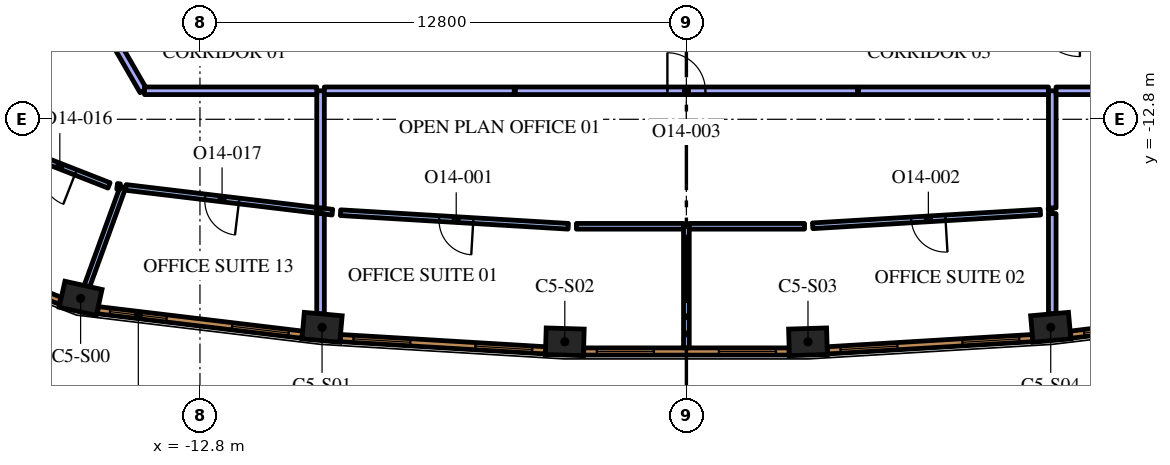
"""IFC4 building model, lengths in metres.
Left out: names, types, materials, properties, quantities, classifications, styles, units other than length and angle.
Written with IfcOpenShell. Run it as: python <this file> out.ifc"""

import sys

from ifc_helpers import new_model, si_unit, direction, frame, frame_2d, origin, origin_2d, place, context, subcontext, project, spatial, rectangle, extrude, element, fill, save


model = new_model("IFC4")
c1 = context("Model", 3, precision=1e-05, world=origin(), true_north=direction((0.0, 1.0)))
c2 = subcontext(c1, "Body", "Model", "MODEL_VIEW")
j1 = project(units=[si_unit("LENGTHUNIT", "METRE"), si_unit("PLANEANGLEUNIT", "RADIAN")], contexts=[c1])
p1 = place(None, origin())
s1 = spatial("IfcSite", under=j1, at=p1, CompositionType="ELEMENT")
p2 = place(p1, origin())
s2 = spatial("IfcBuilding", under=s1, at=p2, CompositionType="ELEMENT")
p3 = place(p2, frame((0.0, 0.0, 313.2)))
s3 = spatial("IfcBuildingStorey", under=s2, at=p3, CompositionType="ELEMENT", Elevation=313.2)
for number, where, z_axis, x_axis in (
    (1, (-15.941, -17.512, 0.0), (0.0, 0.0, 1.0), (0.976, -0.217, 0.0)),
    (2, (-9.587, -18.274, 0.0), (0.0, 0.0, 1.0), (0.996, -0.089, 0.0)),
    (3, (-3.199, -18.655, 0.0), (0.0, 0.0, 1.0), (1.0, -0.03, 0.0)),
    (4, (3.199, -18.655, 0.0), (0.0, 0.0, 1.0), (1.0, 0.03, 0.0)),
    (5, (9.587, -18.274, 0.0), (0.0, 0.0, 1.0), (0.996, 0.089, 0.0)),
):
    element("IfcColumn", number, at=place(p3, frame(where, z_axis=z_axis, x_axis=x_axis)), inside=s3, PredefinedType="COLUMN", context=c2, shape_type="SweptSolid", body=[
        extrude(rectangle(XDim=1.0, YDim=0.7, at=origin_2d()), origin(), (0.0, 0.0, 1.0), 4.2),
    ])
p4 = place(p3, frame((0.0, -15.615, 0.0), z_axis=(0.0, 0.0, 1.0), x_axis=(0.0, -1.0, 0.0)))
e6 = element("IfcWall", 6, at=p4, inside=s3, PredefinedType="PARTITIONING", context=c2, shape_type="SweptSolid", body=[
    extrude(rectangle(XDim=3.2, YDim=0.15, at=frame_2d((1.6, 0.0))), origin(), (0.0, 0.0, 1.0), 3.55),
])
p5 = place(p3, frame((-9.627, -15.207, 0.0), z_axis=(0.0, 0.0, 1.0), x_axis=(0.992909886905, -0.118869493503, 0.0)))
e7 = element("IfcWall", 7, at=p5, inside=s3, PredefinedType="PARTITIONING", context=c2, shape_type="SweptSolid", body=[
    extrude(rectangle(XDim=0.314, YDim=0.15, at=frame_2d((0.157, 0.0))), origin(), (0.0, 0.0, 1.0), 3.55),
])
p6 = place(p3, frame((-3.109, -15.615, 0.0), z_axis=(0.0, 0.0, 1.0), x_axis=(-0.998221243398, 0.059618363188, 0.0)))
e8 = element("IfcWall", 8, at=p6, inside=s3, PredefinedType="PARTITIONING", context=c2, shape_type="SweptSolid", body=[
    extrude(rectangle(XDim=6.003, YDim=0.15, at=frame_2d((3.002, 0.0))), origin(), (0.0, 0.0, 1.0), 3.55),
])
p7 = place(p6, frame((2.503, 0.0, 0.0)))
e9 = element("IfcOpeningElement", 9, at=p7, cuts=e8, PredefinedType="OPENING", context=c2, shape_type="SweptSolid", body=[
    extrude(rectangle(XDim=0.9, YDim=2.1, at=frame_2d((0.45, 1.05))), frame((0.0, 0.085, 0.0), z_axis=(0.0, -1.0, 0.0), x_axis=(1.0, 0.0, 0.0)), (0.0, 0.0, 1.0), 0.17),
])
p8 = place(p3, frame((-2.895, -15.615, 0.0), z_axis=(0.0, 0.0, 1.0), x_axis=(1.0, 0.0, 0.0)))
e10 = element("IfcWall", 10, at=p8, inside=s3, PredefinedType="PARTITIONING", context=c2, shape_type="SweptSolid", body=[
    extrude(rectangle(XDim=2.82, YDim=0.15, at=frame_2d((1.41, 0.0))), origin(), (0.0, 0.0, 1.0), 3.55),
])
p9 = place(p3, frame((-9.627, -17.919, 0.0), z_axis=(0.0, 0.0, 1.0), x_axis=(0.0, 1.0, 0.0)))
e11 = element("IfcWall", 11, at=p9, inside=s3, PredefinedType="PARTITIONING", context=c2, shape_type="SweptSolid", body=[
    extrude(rectangle(XDim=2.636, YDim=0.2, at=frame_2d((1.318, 0.0))), origin(), (0.0, 0.0, 1.0), 3.55),
])
p10 = place(p3, frame((0.075, -15.615, 0.0), z_axis=(0.0, 0.0, 1.0), x_axis=(1.0, 0.0, 0.0)))
e12 = element("IfcWall", 12, at=p10, inside=s3, PredefinedType="PARTITIONING", context=c2, shape_type="SweptSolid", body=[
    extrude(rectangle(XDim=3.034, YDim=0.15, at=frame_2d((1.517, 0.0))), origin(), (0.0, 0.0, 1.0), 3.55),
])
p11 = place(p3, frame((9.315, -15.244, 0.0), z_axis=(0.0, 0.0, 1.0), x_axis=(-0.998218822372, -0.059658885864, 0.0)))
e13 = element("IfcWall", 13, at=p11, inside=s3, PredefinedType="PARTITIONING", context=c2, shape_type="SweptSolid", body=[
    extrude(rectangle(XDim=6.003, YDim=0.15, at=frame_2d((3.002, 0.0))), origin(), (0.0, 0.0, 1.0), 3.55),
])
p12 = place(p11, frame((2.503, 0.0, 0.0)))
e14 = element("IfcOpeningElement", 14, at=p12, cuts=e13, PredefinedType="OPENING", context=c2, shape_type="SweptSolid", body=[
    extrude(rectangle(XDim=0.9, YDim=2.1, at=frame_2d((0.45, 1.05))), frame((0.0, 0.085, 0.0), z_axis=(0.0, -1.0, 0.0), x_axis=(1.0, 0.0, 0.0)), (0.0, 0.0, 1.0), 0.17),
])
p13 = place(p3, frame((9.528, -15.219, 0.0), z_axis=(0.0, 0.0, 1.0), x_axis=(0.992830592569, 0.119529973061, 0.0)))
e15 = element("IfcWall", 15, at=p13, inside=s3, PredefinedType="PARTITIONING", context=c2, shape_type="SweptSolid", body=[
    extrude(rectangle(XDim=0.1, YDim=0.15, at=frame_2d((0.05, 0.0))), origin(), (0.0, 0.0, 1.0), 3.55),
])
p14 = place(p3, frame((9.627, -15.283, 0.0), z_axis=(0.0, 0.0, 1.0), x_axis=(0.0, -1.0, 0.0)))
e16 = element("IfcWall", 16, at=p14, inside=s3, PredefinedType="PARTITIONING", context=c2, shape_type="SweptSolid", body=[
    extrude(rectangle(XDim=2.636, YDim=0.2, at=frame_2d((1.318, 0.0))), origin(), (0.0, 0.0, 1.0), 3.55),
])
for number, where, z_axis, x_axis in (
    (17, (9.627, -12.05, 0.0), (0.0, 0.0, 1.0), (0.0, -1.0, 0.0)),
    (18, (-9.627, -15.132, 0.0), (0.0, 0.0, 1.0), (0.0, 1.0, 0.0)),
):
    element("IfcWall", number, at=place(p3, frame(where, z_axis=z_axis, x_axis=x_axis)), inside=s3, PredefinedType="PARTITIONING", context=c2, shape_type="SweptSolid", body=[
        extrude(rectangle(XDim=3.082, YDim=0.2, at=frame_2d((1.541, 0.0))), origin(), (0.0, 0.0, 1.0), 3.55),
    ])
p15 = place(p3, frame((-4.5, -12.05, 0.0), z_axis=(0.0, 0.0, 1.0), x_axis=(1.0, 0.0, 0.0)))
e19 = element("IfcWall", 19, at=p15, inside=s3, PredefinedType="PARTITIONING", context=c2, shape_type="SweptSolid", body=[
    extrude(rectangle(XDim=9.0, YDim=0.2, at=frame_2d((4.5, 0.0))), origin(), (0.0, 0.0, 1.0), 3.55),
])
p16 = place(p15, frame((4.0, 0.0, 0.0)))
e20 = element("IfcOpeningElement", 20, at=p16, cuts=e19, PredefinedType="OPENING", context=c2, shape_type="SweptSolid", body=[
    extrude(rectangle(XDim=1.0, YDim=2.1, at=frame_2d((0.5, 1.05))), frame((0.0, 0.11, 0.0), z_axis=(0.0, -1.0, 0.0), x_axis=(1.0, 0.0, 0.0)), (0.0, 0.0, 1.0), 0.22),
])
for number, where, z_axis, x_axis in (
    (21, (-9.527, -12.05, 0.0), (0.0, 0.0, 1.0), (1.0, 0.0, 0.0)),
    (22, (4.53, -12.05, 0.0), (0.0, 0.0, 1.0), (1.0, 0.0, 0.0)),
):
    element("IfcWall", number, at=place(p3, frame(where, z_axis=z_axis, x_axis=x_axis)), inside=s3, PredefinedType="PARTITIONING", context=c2, shape_type="SweptSolid", body=[
        extrude(rectangle(XDim=4.997, YDim=0.2, at=frame_2d((2.499, 0.0))), origin(), (0.0, 0.0, 1.0), 3.55),
    ])
p17 = place(p3, frame((9.727, -12.05, 0.0), z_axis=(0.0, 0.0, 1.0), x_axis=(1.0, 0.0, 0.0)))
e23 = element("IfcWall", 23, at=p17, inside=s3, PredefinedType="PARTITIONING", context=c2, shape_type="SweptSolid", body=[
    extrude(rectangle(XDim=4.562, YDim=0.2, at=frame_2d((2.281, 0.0))), origin(), (0.0, 0.0, 1.0), 3.55),
])
p18 = place(p17, frame((1.8, 0.0, 0.0)))
e24 = element("IfcOpeningElement", 24, at=p18, cuts=e23, PredefinedType="OPENING", context=c2, shape_type="SweptSolid", body=[
    extrude(rectangle(XDim=1.0, YDim=2.1, at=frame_2d((0.5, 1.05))), frame((0.0, 0.11, 0.0), z_axis=(0.0, -1.0, 0.0), x_axis=(1.0, 0.0, 0.0)), (0.0, 0.0, 1.0), 0.22),
])
p19 = place(p3, frame((-14.826, -14.584, 0.0), z_axis=(0.0, 0.0, 1.0), x_axis=(-0.341806672652, -0.9397702903, 0.0)))
e25 = element("IfcWall", 25, at=p19, inside=s3, PredefinedType="PARTITIONING", context=c2, shape_type="SweptSolid", body=[
    extrude(rectangle(XDim=2.773, YDim=0.15, at=frame_2d((1.387, 0.0))), origin(), (0.0, 0.0, 1.0), 3.55),
])
p20 = place(p3, frame((-15.193, -14.54, 0.0), z_axis=(0.0, 0.0, 1.0), x_axis=(-0.930968616147, 0.36509921357, 0.0)))
e26 = element("IfcWall", 26, at=p20, inside=s3, PredefinedType="PARTITIONING", context=c2, shape_type="SweptSolid", body=[
    extrude(rectangle(XDim=2.841, YDim=0.15, at=frame_2d((1.42, 0.0))), origin(), (0.0, 0.0, 1.0), 3.55),
])
p21 = place(p20, frame((0.941, 0.0, 0.0)))
e27 = element("IfcOpeningElement", 27, at=p21, cuts=e26, PredefinedType="OPENING", context=c2, shape_type="SweptSolid", body=[
    extrude(rectangle(XDim=0.9, YDim=2.1, at=frame_2d((0.45, 1.05))), frame((0.0, 0.085, 0.0), z_axis=(0.0, -1.0, 0.0), x_axis=(1.0, 0.0, 0.0)), (0.0, 0.0, 1.0), 0.17),
])
p22 = place(p3, frame((-14.98, -14.565, 0.0), z_axis=(0.0, 0.0, 1.0), x_axis=(0.992847073299, -0.119393002485, 0.0)))
e28 = element("IfcWall", 28, at=p22, inside=s3, PredefinedType="PARTITIONING", context=c2, shape_type="SweptSolid", body=[
    extrude(rectangle(XDim=0.078, YDim=0.15, at=frame_2d((0.039, 0.0))), origin(), (0.0, 0.0, 1.0), 3.55),
])
p23 = place(p3, frame((-9.727, -15.195, 0.0), z_axis=(0.0, 0.0, 1.0), x_axis=(-0.992892587246, 0.119013907556, 0.0)))
e29 = element("IfcWall", 29, at=p23, inside=s3, PredefinedType="PARTITIONING", context=c2, shape_type="SweptSolid", body=[
    extrude(rectangle(XDim=5.059, YDim=0.15, at=frame_2d((2.529, 0.0))), origin(), (0.0, 0.0, 1.0), 3.55),
])
p24 = place(p23, frame((2.059, 0.0, 0.0)))
e30 = element("IfcOpeningElement", 30, at=p24, cuts=e29, PredefinedType="OPENING", context=c2, shape_type="SweptSolid", body=[
    extrude(rectangle(XDim=0.9, YDim=2.1, at=frame_2d((0.45, 1.05))), frame((0.0, 0.085, 0.0), z_axis=(0.0, -1.0, 0.0), x_axis=(1.0, 0.0, 0.0)), (0.0, 0.0, 1.0), 0.17),
])
p25 = place(p3, frame((-17.364, -11.064, 0.0), z_axis=(0.0, 0.0, 1.0), x_axis=(0.866018827591, 0.500011390128, 0.0)))
e31 = element("IfcWall", 31, at=p25, inside=s3, PredefinedType="PARTITIONING", context=c2, shape_type="SweptSolid", body=[
    extrude(rectangle(XDim=2.17, YDim=0.2, at=frame_2d((1.085, 0.0))), origin(), (0.0, 0.0, 1.0), 3.55),
])
p26 = place(p3, frame((-15.47, -10.005, 0.0), z_axis=(0.0, 0.0, 1.0), x_axis=(0.500053625724, -0.865994440744, 0.0)))
e32 = element("IfcWall", 32, at=p26, inside=s3, PredefinedType="PARTITIONING", context=c2, shape_type="SweptSolid", body=[
    extrude(rectangle(XDim=2.361, YDim=0.2, at=frame_2d((1.181, 0.0))), origin(), (0.0, 0.0, 1.0), 3.55),
])
p27 = place(p3, frame((-14.26, -12.05, 0.0), z_axis=(0.0, 0.0, 1.0), x_axis=(1.0, 0.0, 0.0)))
e33 = element("IfcWall", 33, at=p27, inside=s3, PredefinedType="PARTITIONING", context=c2, shape_type="SweptSolid", body=[
    extrude(rectangle(XDim=4.532, YDim=0.2, at=frame_2d((2.266, 0.0))), origin(), (0.0, 0.0, 1.0), 3.55),
])
p28 = place(p3, frame((-15.487, -17.823, 0.0), z_axis=(0.0, 0.0, 1.0), x_axis=(0.992885582795, -0.119072328769, 0.0)))
e34 = element("IfcWall", 34, at=p28, inside=s3, PredefinedType="SOLIDWALL", context=c2, shape_type="SweptSolid", body=[
    extrude(rectangle(XDim=5.415, YDim=0.19, at=frame_2d((2.708, 0.0))), origin(), (0.0, 0.0, 1.0), 3.95),
])
p29 = place(p28, frame((0.323, 0.0, 0.6)))
e35 = element("IfcOpeningElement", 35, at=p29, cuts=e34, PredefinedType="OPENING", context=c2, shape_type="SweptSolid", body=[
    extrude(rectangle(XDim=1.5, YDim=2.85, at=frame_2d((0.75, 1.425))), frame((0.0, 0.105, 0.0), z_axis=(0.0, -1.0, 0.0), x_axis=(1.0, 0.0, 0.0)), (0.0, 0.0, 1.0), 0.21),
])
p30 = place(p28, frame((3.558, 0.0, 0.6)))
e36 = element("IfcOpeningElement", 36, at=p30, cuts=e34, PredefinedType="OPENING", context=c2, shape_type="SweptSolid", body=[
    extrude(rectangle(XDim=1.5, YDim=2.85, at=frame_2d((0.75, 1.425))), frame((0.0, 0.105, 0.0), z_axis=(0.0, -1.0, 0.0), x_axis=(1.0, 0.0, 0.0)), (0.0, 0.0, 1.0), 0.21),
])
p31 = place(p3, frame((-9.107, -18.558, 0.0), z_axis=(0.0, 0.0, 1.0), x_axis=(0.998221492823, -0.059614186786, 0.0)))
e37 = element("IfcWall", 37, at=p31, inside=s3, PredefinedType="SOLIDWALL", context=c2, shape_type="SweptSolid", body=[
    extrude(rectangle(XDim=5.406, YDim=0.19, at=frame_2d((2.703, 0.0))), origin(), (0.0, 0.0, 1.0), 3.95),
])
p32 = place(p31, frame((0.346, 0.0, 0.6)))
e38 = element("IfcOpeningElement", 38, at=p32, cuts=e37, PredefinedType="OPENING", context=c2, shape_type="SweptSolid", body=[
    extrude(rectangle(XDim=1.5, YDim=2.85, at=frame_2d((0.75, 1.425))), frame((0.0, 0.105, 0.0), z_axis=(0.0, -1.0, 0.0), x_axis=(1.0, 0.0, 0.0)), (0.0, 0.0, 1.0), 0.21),
])
p33 = place(p31, frame((3.559, 0.0, 0.6)))
e39 = element("IfcOpeningElement", 39, at=p33, cuts=e37, PredefinedType="OPENING", context=c2, shape_type="SweptSolid", body=[
    extrude(rectangle(XDim=1.5, YDim=2.85, at=frame_2d((0.75, 1.425))), frame((0.0, 0.105, 0.0), z_axis=(0.0, -1.0, 0.0), x_axis=(1.0, 0.0, 0.0)), (0.0, 0.0, 1.0), 0.21),
])
p34 = place(p3, frame((-2.703, -18.91, 0.0), z_axis=(0.0, 0.0, 1.0), x_axis=(1.0, 0.0, 0.0)))
e40 = element("IfcWall", 40, at=p34, inside=s3, PredefinedType="SOLIDWALL", context=c2, shape_type="SweptSolid", body=[
    extrude(rectangle(XDim=5.406, YDim=0.19, at=frame_2d((2.703, 0.0))), origin(), (0.0, 0.0, 1.0), 3.95),
])
p35 = place(p34, frame((0.346, 0.0, 0.6)))
e41 = element("IfcOpeningElement", 41, at=p35, cuts=e40, PredefinedType="OPENING", context=c2, shape_type="SweptSolid", body=[
    extrude(rectangle(XDim=1.5, YDim=2.85, at=frame_2d((0.75, 1.425))), frame((0.0, 0.105, 0.0), z_axis=(0.0, -1.0, 0.0), x_axis=(1.0, 0.0, 0.0)), (0.0, 0.0, 1.0), 0.21),
])
p36 = place(p34, frame((3.56, 0.0, 0.6)))
e42 = element("IfcOpeningElement", 42, at=p36, cuts=e40, PredefinedType="OPENING", context=c2, shape_type="SweptSolid", body=[
    extrude(rectangle(XDim=1.5, YDim=2.85, at=frame_2d((0.75, 1.425))), frame((0.0, 0.105, 0.0), z_axis=(0.0, -1.0, 0.0), x_axis=(1.0, 0.0, 0.0)), (0.0, 0.0, 1.0), 0.21),
])
p37 = place(p3, frame((3.71, -18.88, 0.0), z_axis=(0.0, 0.0, 1.0), x_axis=(0.998221492823, 0.059614186786, 0.0)))
e43 = element("IfcWall", 43, at=p37, inside=s3, PredefinedType="SOLIDWALL", context=c2, shape_type="SweptSolid", body=[
    extrude(rectangle(XDim=5.406, YDim=0.19, at=frame_2d((2.703, 0.0))), origin(), (0.0, 0.0, 1.0), 3.95),
])
p38 = place(p37, frame((0.346, 0.0, 0.6)))
e44 = element("IfcOpeningElement", 44, at=p38, cuts=e43, PredefinedType="OPENING", context=c2, shape_type="SweptSolid", body=[
    extrude(rectangle(XDim=1.5, YDim=2.85, at=frame_2d((0.75, 1.425))), frame((0.0, 0.105, 0.0), z_axis=(0.0, -1.0, 0.0), x_axis=(1.0, 0.0, 0.0)), (0.0, 0.0, 1.0), 0.21),
])
p39 = place(p37, frame((3.559, 0.0, 0.6)))
e45 = element("IfcOpeningElement", 45, at=p39, cuts=e43, PredefinedType="OPENING", context=c2, shape_type="SweptSolid", body=[
    extrude(rectangle(XDim=1.5, YDim=2.85, at=frame_2d((0.75, 1.425))), frame((0.0, 0.105, 0.0), z_axis=(0.0, -1.0, 0.0), x_axis=(1.0, 0.0, 0.0)), (0.0, 0.0, 1.0), 0.21),
])
p40 = place(p3, frame((10.111, -18.468, 0.0), z_axis=(0.0, 0.0, 1.0), x_axis=(0.992885582795, 0.119072328769, 0.0)))
e46 = element("IfcWall", 46, at=p40, inside=s3, PredefinedType="SOLIDWALL", context=c2, shape_type="SweptSolid", body=[
    extrude(rectangle(XDim=5.415, YDim=0.19, at=frame_2d((2.708, 0.0))), origin(), (0.0, 0.0, 1.0), 3.95),
])
p41 = place(p40, frame((0.357, 0.0, 0.6)))
e47 = element("IfcOpeningElement", 47, at=p41, cuts=e46, PredefinedType="OPENING", context=c2, shape_type="SweptSolid", body=[
    extrude(rectangle(XDim=1.5, YDim=2.85, at=frame_2d((0.75, 1.425))), frame((0.0, 0.105, 0.0), z_axis=(0.0, -1.0, 0.0), x_axis=(1.0, 0.0, 0.0)), (0.0, 0.0, 1.0), 0.21),
])
p42 = place(p40, frame((3.593, 0.0, 0.6)))
e48 = element("IfcOpeningElement", 48, at=p42, cuts=e46, PredefinedType="OPENING", context=c2, shape_type="SweptSolid", body=[
    extrude(rectangle(XDim=1.5, YDim=2.85, at=frame_2d((0.75, 1.425))), frame((0.0, 0.105, 0.0), z_axis=(0.0, -1.0, 0.0), x_axis=(1.0, 0.0, 0.0)), (0.0, 0.0, 1.0), 0.21),
])
p43 = place(p3, frame((-19.496, -16.392, 0.0), z_axis=(0.0, 0.0, 1.0), x_axis=(0.93100888477, -0.364996515709, 0.0)))
e49 = element("IfcWall", 49, at=p43, inside=s3, PredefinedType="SOLIDWALL", context=c2, shape_type="SweptSolid", body=[
    extrude(rectangle(XDim=3.237, YDim=0.19, at=frame_2d((1.618, 0.0))), origin(), (0.0, 0.0, 1.0), 3.95),
])
p44 = place(p43, frame((1.068, 0.0, 0.6)))
e50 = element("IfcOpeningElement", 50, at=p44, cuts=e49, PredefinedType="OPENING", context=c2, shape_type="SweptSolid", body=[
    extrude(rectangle(XDim=1.1, YDim=2.85, at=frame_2d((0.55, 1.425))), frame((0.0, 0.105, 0.0), z_axis=(0.0, -1.0, 0.0), x_axis=(1.0, 0.0, 0.0)), (0.0, 0.0, 1.0), 0.21),
])
p45 = place(p7, origin())
e51 = element("IfcDoor", 51, at=p45, inside=s3, OperationType="SINGLE_SWING_LEFT", PredefinedType="DOOR", context=c2, shape_type="SweptSolid", body=[
    extrude(rectangle(XDim=0.9, YDim=2.1, at=frame_2d((0.45, 1.05))), frame((0.0, 0.025, 0.0), z_axis=(0.0, -1.0, 0.0), x_axis=(1.0, 0.0, 0.0)), (0.0, 0.0, 1.0), 0.05),
])
fill(e9, e51)
p46 = place(p12, origin())
e52 = element("IfcDoor", 52, at=p46, inside=s3, OperationType="SINGLE_SWING_LEFT", PredefinedType="DOOR", context=c2, shape_type="SweptSolid", body=[
    extrude(rectangle(XDim=0.9, YDim=2.1, at=frame_2d((0.45, 1.05))), frame((0.0, 0.025, 0.0), z_axis=(0.0, -1.0, 0.0), x_axis=(1.0, 0.0, 0.0)), (0.0, 0.0, 1.0), 0.05),
])
fill(e14, e52)
p47 = place(p16, origin())
e53 = element("IfcDoor", 53, at=p47, inside=s3, OperationType="SINGLE_SWING_RIGHT", PredefinedType="DOOR", context=c2, shape_type="SweptSolid", body=[
    extrude(rectangle(XDim=1.0, YDim=2.1, at=frame_2d((0.5, 1.05))), frame((0.0, 0.025, 0.0), z_axis=(0.0, -1.0, 0.0), x_axis=(1.0, 0.0, 0.0)), (0.0, 0.0, 1.0), 0.05),
])
fill(e20, e53)
p48 = place(p21, origin())
e54 = element("IfcDoor", 54, at=p48, inside=s3, OperationType="SINGLE_SWING_LEFT", PredefinedType="DOOR", context=c2, shape_type="SweptSolid", body=[
    extrude(rectangle(XDim=0.9, YDim=2.1, at=frame_2d((0.45, 1.05))), frame((0.0, 0.025, 0.0), z_axis=(0.0, -1.0, 0.0), x_axis=(1.0, 0.0, 0.0)), (0.0, 0.0, 1.0), 0.05),
])
fill(e27, e54)
p49 = place(p24, origin())
e55 = element("IfcDoor", 55, at=p49, inside=s3, OperationType="SINGLE_SWING_LEFT", PredefinedType="DOOR", context=c2, shape_type="SweptSolid", body=[
    extrude(rectangle(XDim=0.9, YDim=2.1, at=frame_2d((0.45, 1.05))), frame((0.0, 0.025, 0.0), z_axis=(0.0, -1.0, 0.0), x_axis=(1.0, 0.0, 0.0)), (0.0, 0.0, 1.0), 0.05),
])
fill(e30, e55)
p50 = place(p29, origin())
e56 = element("IfcWindow", 56, at=p50, inside=s3, PartitioningType="SINGLE_PANEL", PredefinedType="WINDOW", context=c2, shape_type="SweptSolid", body=[
    extrude(rectangle(XDim=1.5, YDim=2.85, at=frame_2d((0.75, 1.425))), frame((0.0, 0.045, 0.0), z_axis=(0.0, -1.0, 0.0), x_axis=(1.0, 0.0, 0.0)), (0.0, 0.0, 1.0), 0.06),
])
fill(e35, e56)
p51 = place(p30, origin())
e57 = element("IfcWindow", 57, at=p51, inside=s3, PartitioningType="SINGLE_PANEL", PredefinedType="WINDOW", context=c2, shape_type="SweptSolid", body=[
    extrude(rectangle(XDim=1.5, YDim=2.85, at=frame_2d((0.75, 1.425))), frame((0.0, 0.045, 0.0), z_axis=(0.0, -1.0, 0.0), x_axis=(1.0, 0.0, 0.0)), (0.0, 0.0, 1.0), 0.06),
])
fill(e36, e57)
p52 = place(p32, origin())
e58 = element("IfcWindow", 58, at=p52, inside=s3, PartitioningType="SINGLE_PANEL", PredefinedType="WINDOW", context=c2, shape_type="SweptSolid", body=[
    extrude(rectangle(XDim=1.5, YDim=2.85, at=frame_2d((0.75, 1.425))), frame((0.0, 0.045, 0.0), z_axis=(0.0, -1.0, 0.0), x_axis=(1.0, 0.0, 0.0)), (0.0, 0.0, 1.0), 0.06),
])
fill(e38, e58)
p53 = place(p33, origin())
e59 = element("IfcWindow", 59, at=p53, inside=s3, PartitioningType="SINGLE_PANEL", PredefinedType="WINDOW", context=c2, shape_type="SweptSolid", body=[
    extrude(rectangle(XDim=1.5, YDim=2.85, at=frame_2d((0.75, 1.425))), frame((0.0, 0.045, 0.0), z_axis=(0.0, -1.0, 0.0), x_axis=(1.0, 0.0, 0.0)), (0.0, 0.0, 1.0), 0.06),
])
fill(e39, e59)
p54 = place(p35, origin())
e60 = element("IfcWindow", 60, at=p54, inside=s3, PartitioningType="SINGLE_PANEL", PredefinedType="WINDOW", context=c2, shape_type="SweptSolid", body=[
    extrude(rectangle(XDim=1.5, YDim=2.85, at=frame_2d((0.75, 1.425))), frame((0.0, 0.045, 0.0), z_axis=(0.0, -1.0, 0.0), x_axis=(1.0, 0.0, 0.0)), (0.0, 0.0, 1.0), 0.06),
])
fill(e41, e60)
p55 = place(p36, origin())
e61 = element("IfcWindow", 61, at=p55, inside=s3, PartitioningType="SINGLE_PANEL", PredefinedType="WINDOW", context=c2, shape_type="SweptSolid", body=[
    extrude(rectangle(XDim=1.5, YDim=2.85, at=frame_2d((0.75, 1.425))), frame((0.0, 0.045, 0.0), z_axis=(0.0, -1.0, 0.0), x_axis=(1.0, 0.0, 0.0)), (0.0, 0.0, 1.0), 0.06),
])
fill(e42, e61)
p56 = place(p38, origin())
e62 = element("IfcWindow", 62, at=p56, inside=s3, PartitioningType="SINGLE_PANEL", PredefinedType="WINDOW", context=c2, shape_type="SweptSolid", body=[
    extrude(rectangle(XDim=1.5, YDim=2.85, at=frame_2d((0.75, 1.425))), frame((0.0, 0.045, 0.0), z_axis=(0.0, -1.0, 0.0), x_axis=(1.0, 0.0, 0.0)), (0.0, 0.0, 1.0), 0.06),
])
fill(e44, e62)
p57 = place(p39, origin())
e63 = element("IfcWindow", 63, at=p57, inside=s3, PartitioningType="SINGLE_PANEL", PredefinedType="WINDOW", context=c2, shape_type="SweptSolid", body=[
    extrude(rectangle(XDim=1.5, YDim=2.85, at=frame_2d((0.75, 1.425))), frame((0.0, 0.045, 0.0), z_axis=(0.0, -1.0, 0.0), x_axis=(1.0, 0.0, 0.0)), (0.0, 0.0, 1.0), 0.06),
])
fill(e45, e63)
p58 = place(p41, origin())
e64 = element("IfcWindow", 64, at=p58, inside=s3, PartitioningType="SINGLE_PANEL", PredefinedType="WINDOW", context=c2, shape_type="SweptSolid", body=[
    extrude(rectangle(XDim=1.5, YDim=2.85, at=frame_2d((0.75, 1.425))), frame((0.0, 0.045, 0.0), z_axis=(0.0, -1.0, 0.0), x_axis=(1.0, 0.0, 0.0)), (0.0, 0.0, 1.0), 0.06),
])
fill(e47, e64)
save(model, sys.argv[1])
